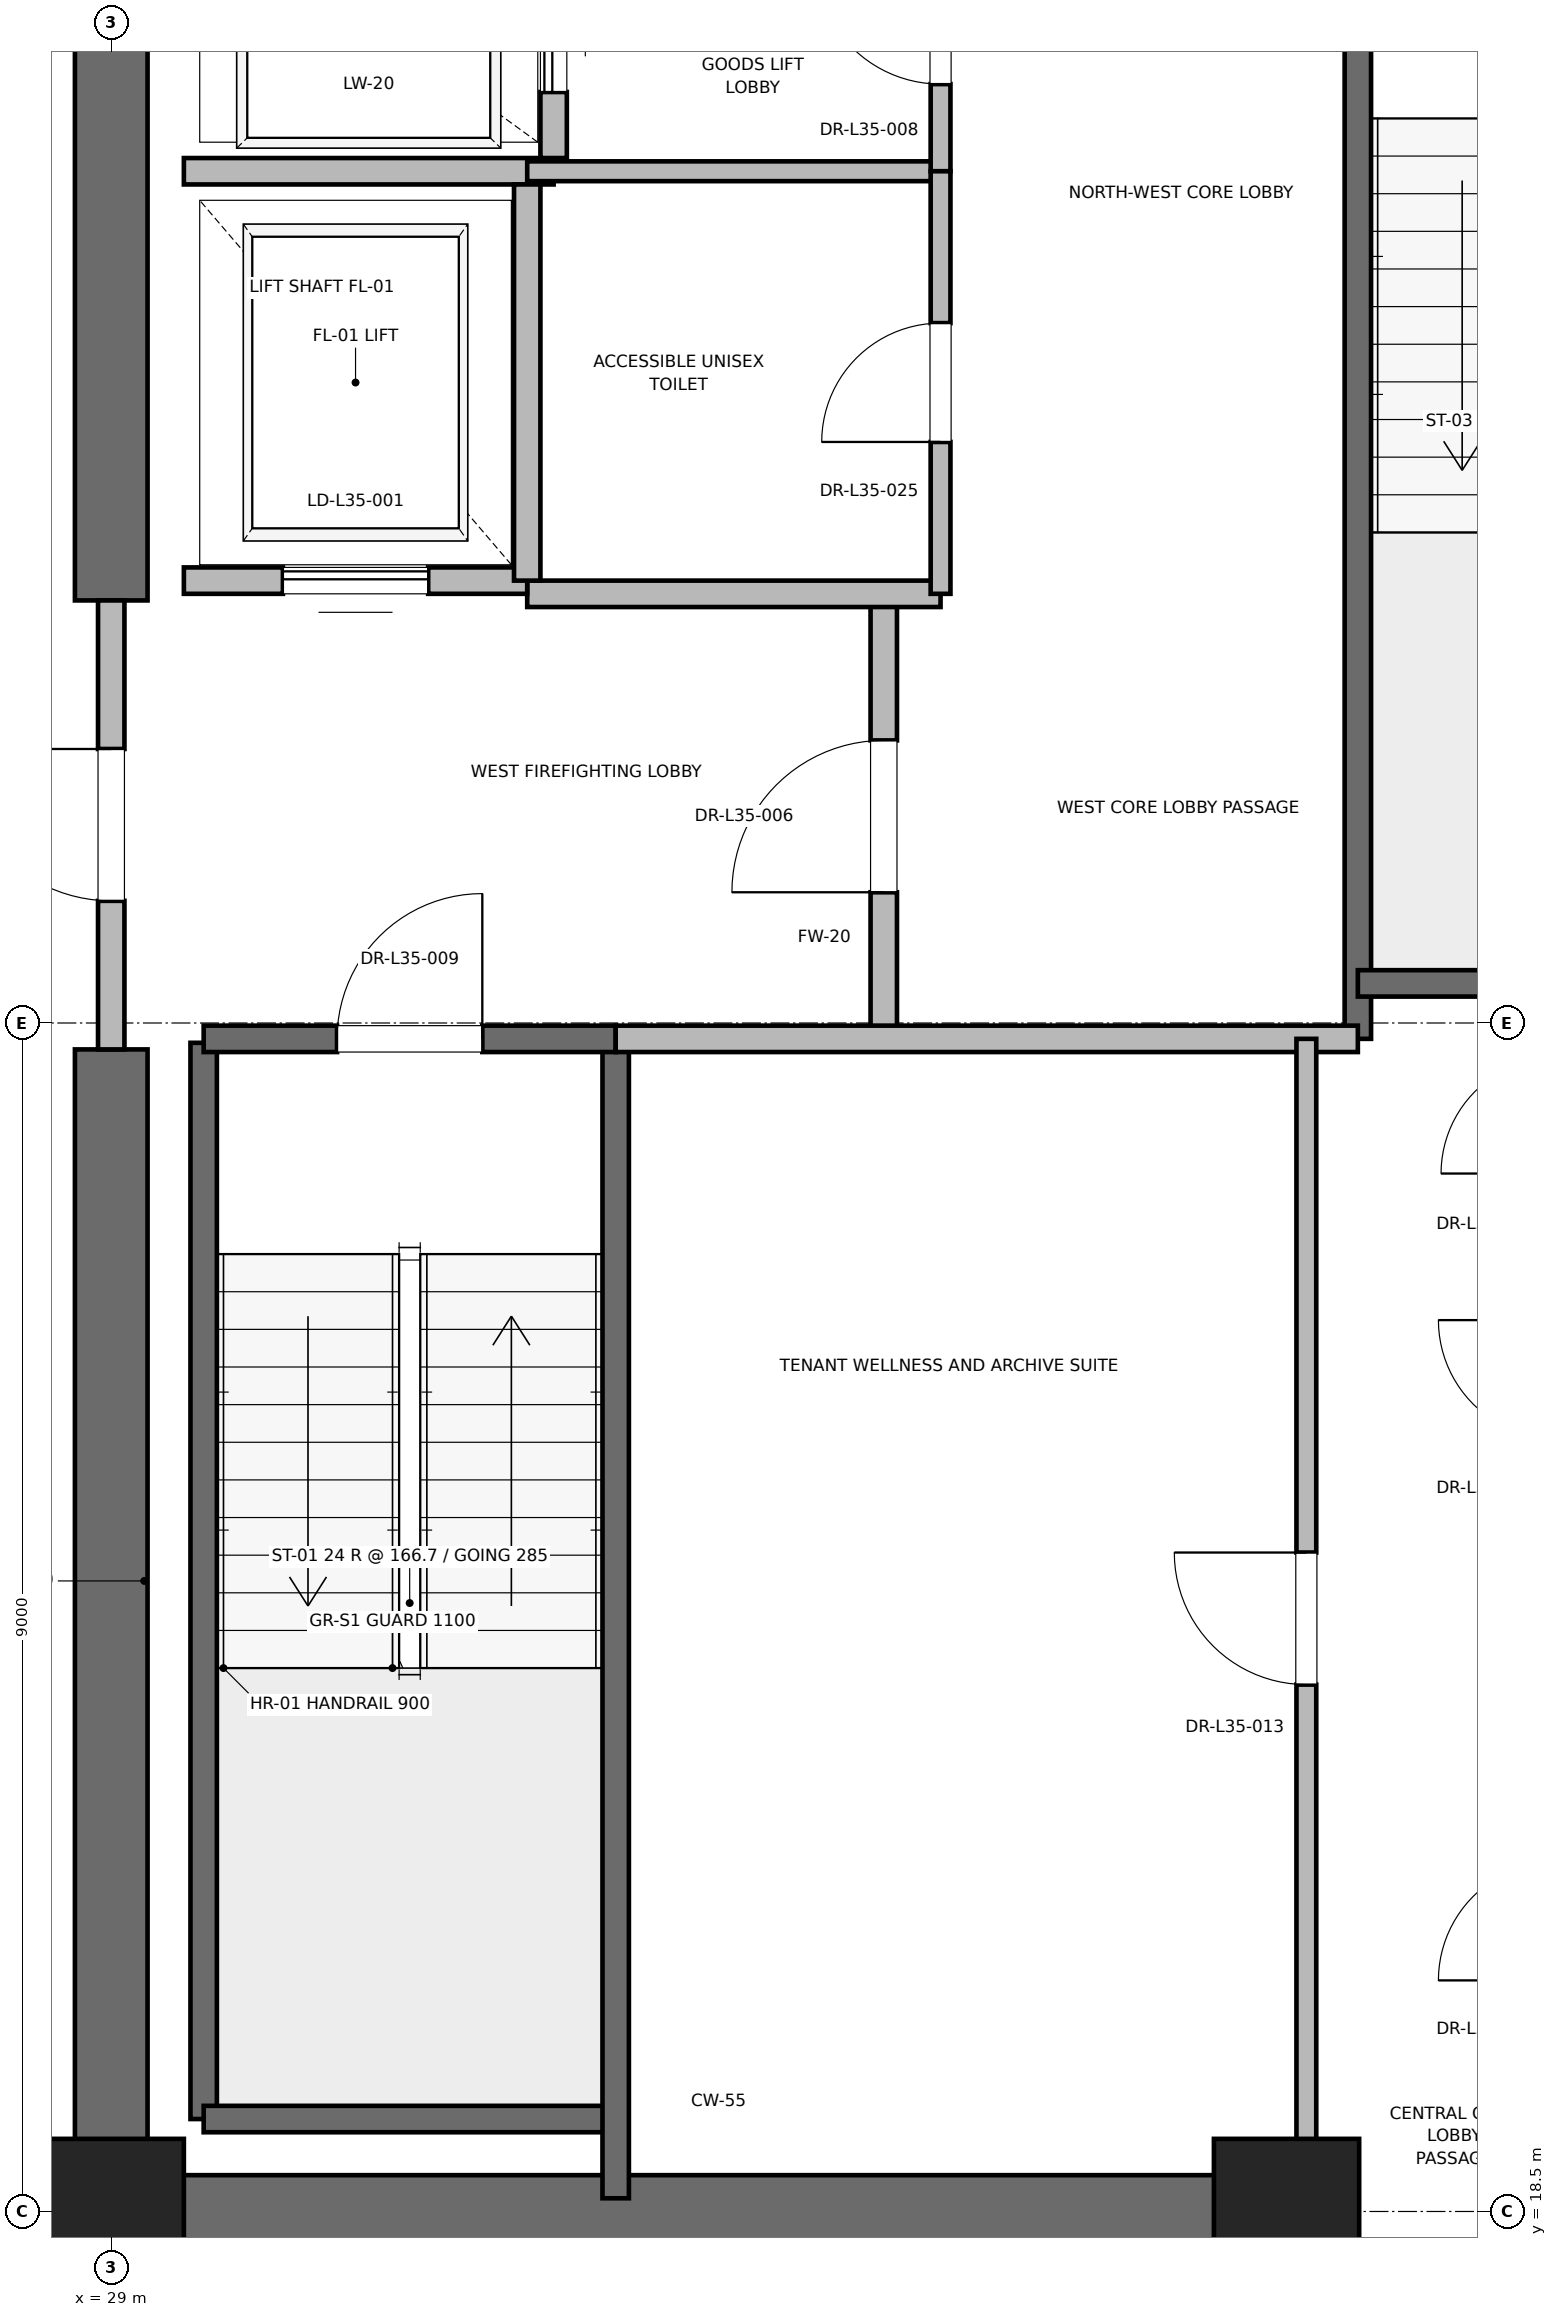
"""IFC4 building model, lengths in metres.
Left out: names, types, materials, properties, quantities, classifications, styles, units other than length and angle.
Written with IfcOpenShell. Run it as: python <this file> out.ifc"""

import sys

from ifc_helpers import new_model, si_unit, direction, frame, frame_2d, origin, origin_2d, place, context, subcontext, project, spatial, rectangle, extrude, element, fill, save


model = new_model("IFC4")
c1 = context("Model", 3, precision=1e-05, world=origin(), true_north=direction((0.0, 1.0)))
c2 = subcontext(c1, "Body", "Model", "MODEL_VIEW")
j1 = project(units=[si_unit("LENGTHUNIT", "METRE"), si_unit("PLANEANGLEUNIT", "RADIAN")], contexts=[c1])
p1 = place(None, origin())
s1 = spatial("IfcSite", under=j1, at=p1, CompositionType="ELEMENT")
p2 = place(p1, origin())
s2 = spatial("IfcBuilding", under=s1, at=p2, CompositionType="ELEMENT")
p3 = place(p2, frame((0.0, 0.0, 152.4)))
s3 = spatial("IfcBuildingStorey", under=s2, at=p3, CompositionType="ELEMENT", Elevation=152.4)
for number, where, z_axis, x_axis in (
    (1, (29.0, 18.5, 0.0), (0.0, 0.0, 1.0), (1.0, 0.0, 0.0)),
    (2, (37.9, 18.5, 0.0), (0.0, 0.0, 1.0), (1.0, 0.0, 0.0)),
):
    element("IfcColumn", number, at=place(p3, frame(where, z_axis=z_axis, x_axis=x_axis)), inside=s3, PredefinedType="PILASTER", context=c2, shape_type="SweptSolid", body=[
        extrude(rectangle(XDim=1.1, YDim=1.1, at=origin_2d()), origin(), (0.0, 0.0, 1.0), 4.0),
    ])
p4 = place(p3, frame((29.0, 18.5, 0.0), z_axis=(0.0, 0.0, 1.0), x_axis=(1.0, 0.0, 0.0)))
e3 = element("IfcWall", 3, at=p4, inside=s3, PredefinedType="SHEAR", context=c2, shape_type="SweptSolid", body=[
    extrude(rectangle(XDim=9.2, YDim=0.55, at=frame_2d((4.6, 0.0))), origin(), (0.0, 0.0, 1.0), 3.775),
])
p5 = place(p3, frame((29.0, 18.5, 0.0), z_axis=(0.0, 0.0, 1.0), x_axis=(0.0, 1.0, 0.0)))
e4 = element("IfcWall", 4, at=p5, inside=s3, PredefinedType="SHEAR", context=c2, shape_type="SweptSolid", body=[
    extrude(rectangle(XDim=8.8, YDim=0.55, at=frame_2d((4.4, 0.0))), origin(), (0.0, 0.0, 1.0), 3.775),
])
p6 = place(p3, frame((29.0, 30.7, 0.0), z_axis=(0.0, 0.0, 1.0), x_axis=(0.0, 1.0, 0.0)))
e5 = element("IfcWall", 5, at=p6, inside=s3, PredefinedType="SHEAR", context=c2, shape_type="SweptSolid", body=[
    extrude(rectangle(XDim=5.8, YDim=0.55, at=frame_2d((2.9, 0.0))), origin(), (0.0, 0.0, 1.0), 3.775),
])
p7 = place(p3, frame((29.7, 19.2, 0.0), z_axis=(0.0, 0.0, 1.0), x_axis=(0.0, 1.0, 0.0)))
e6 = element("IfcWall", 6, at=p7, inside=s3, PredefinedType="SOLIDWALL", context=c2, shape_type="SweptSolid", body=[
    extrude(rectangle(XDim=8.15, YDim=0.2, at=frame_2d((4.075, 0.0))), origin(), (0.0, 0.0, 1.0), 3.775),
])
p8 = place(p3, frame((29.7, 19.2, 0.0), z_axis=(0.0, 0.0, 1.0), x_axis=(1.0, 0.0, 0.0)))
e7 = element("IfcWall", 7, at=p8, inside=s3, PredefinedType="SOLIDWALL", context=c2, shape_type="SweptSolid", body=[
    extrude(rectangle(XDim=3.12, YDim=0.2, at=frame_2d((1.56, 0.0))), origin(), (0.0, 0.0, 1.0), 3.775),
])
p9 = place(p3, frame((32.82, 18.6, 0.0), z_axis=(0.0, 0.0, 1.0), x_axis=(0.0, 1.0, 0.0)))
e8 = element("IfcWall", 8, at=p9, inside=s3, PredefinedType="SOLIDWALL", context=c2, shape_type="SweptSolid", body=[
    extrude(rectangle(XDim=8.78, YDim=0.2, at=frame_2d((4.39, 0.0))), origin(), (0.0, 0.0, 1.0), 3.775),
])
p10 = place(p3, frame((29.7, 27.38, 0.0), z_axis=(0.0, 0.0, 1.0), x_axis=(1.0, 0.0, 0.0)))
e9 = element("IfcWall", 9, at=p10, inside=s3, PredefinedType="SOLIDWALL", context=c2, shape_type="SweptSolid", body=[
    extrude(rectangle(XDim=3.12, YDim=0.2, at=frame_2d((1.56, 0.0))), origin(), (0.0, 0.0, 1.0), 3.775),
])
p11 = place(p10, frame((1.01, 0.0, 0.0)))
e10 = element("IfcOpeningElement", 10, at=p11, cuts=e9, PredefinedType="OPENING", context=c2, shape_type="SweptSolid", body=[
    extrude(rectangle(XDim=1.1, YDim=2.15, at=frame_2d((0.55, 1.075))), frame((0.0, 0.1, 0.0), z_axis=(0.0, -1.0, 0.0), x_axis=(1.0, 0.0, 0.0)), (0.0, 0.0, 1.0), 0.2),
])
p12 = place(p3, frame((38.44, 27.38, 0.0), z_axis=(0.0, 0.0, 1.0), x_axis=(0.0, 1.0, 0.0)))
e11 = element("IfcWall", 11, at=p12, inside=s3, PredefinedType="SOLIDWALL", context=c2, shape_type="SweptSolid", body=[
    extrude(rectangle(XDim=8.87, YDim=0.2, at=frame_2d((4.435, 0.0))), origin(), (0.0, 0.0, 1.0), 3.775),
])
p13 = place(p3, frame((38.44, 27.8, 0.0), z_axis=(0.0, 0.0, 1.0), x_axis=(1.0, 0.0, 0.0)))
e12 = element("IfcWall", 12, at=p13, inside=s3, PredefinedType="SOLIDWALL", context=c2, shape_type="SweptSolid", body=[
    extrude(rectangle(XDim=3.32, YDim=0.2, at=frame_2d((1.66, 0.0))), origin(), (0.0, 0.0, 1.0), 3.775),
])
p14 = place(p3, frame((34.85, 27.38, 0.0), z_axis=(0.0, 0.0, 1.0), x_axis=(0.0, 1.0, 0.0)))
e13 = element("IfcWall", 13, at=p14, inside=s3, PredefinedType="PARTITIONING", context=c2, shape_type="SweptSolid", body=[
    extrude(rectangle(XDim=3.37, YDim=0.2, at=frame_2d((1.685, 0.0))), origin(), (0.0, 0.0, 1.0), 3.775),
])
p15 = place(p14, frame((1.11, 0.0, 0.0)))
e14 = element("IfcOpeningElement", 14, at=p15, cuts=e13, PredefinedType="OPENING", context=c2, shape_type="SweptSolid", body=[
    extrude(rectangle(XDim=1.15, YDim=2.2, at=frame_2d((0.575, 1.1))), frame((0.0, 0.1, 0.0), z_axis=(0.0, -1.0, 0.0), x_axis=(1.0, 0.0, 0.0)), (0.0, 0.0, 1.0), 0.2),
])
p16 = place(p3, frame((29.0, 27.3, 0.0), z_axis=(0.0, 0.0, 1.0), x_axis=(0.0, 1.0, 0.0)))
e15 = element("IfcWall", 15, at=p16, inside=s3, PredefinedType="PARTITIONING", context=c2, shape_type="SweptSolid", body=[
    extrude(rectangle(XDim=3.4, YDim=0.2, at=frame_2d((1.7, 0.0))), origin(), (0.0, 0.0, 1.0), 2.755),
])
p17 = place(p16, frame((1.125, 0.0, 0.0)))
e16 = element("IfcOpeningElement", 16, at=p17, cuts=e15, PredefinedType="OPENING", context=c2, shape_type="SweptSolid", body=[
    extrude(rectangle(XDim=1.15, YDim=2.2, at=frame_2d((0.575, 1.1))), frame((0.0, 0.1, 0.0), z_axis=(0.0, -1.0, 0.0), x_axis=(1.0, 0.0, 0.0)), (0.0, 0.0, 1.0), 0.2),
])
p18 = place(p3, frame((32.82, 27.38, 0.0), z_axis=(0.0, 0.0, 1.0), x_axis=(1.0, 0.0, 0.0)))
e17 = element("IfcWall", 17, at=p18, inside=s3, PredefinedType="PARTITIONING", context=c2, shape_type="SweptSolid", body=[
    extrude(rectangle(XDim=5.62, YDim=0.2, at=frame_2d((2.81, 0.0))), origin(), (0.0, 0.0, 1.0), 3.775),
])
p19 = place(p3, frame((32.15, 30.75, 0.0), z_axis=(0.0, 0.0, 1.0), x_axis=(1.0, 0.0, 0.0)))
e18 = element("IfcWall", 18, at=p19, inside=s3, PredefinedType="PARTITIONING", context=c2, shape_type="SweptSolid", body=[
    extrude(rectangle(XDim=3.13, YDim=0.2, at=frame_2d((1.565, 0.0))), origin(), (0.0, 0.0, 1.0), 3.775),
])
p20 = place(p3, frame((29.55, 30.85, 0.0), z_axis=(0.0, 0.0, 1.0), x_axis=(1.0, 0.0, 0.0)))
e19 = element("IfcWall", 19, at=p20, inside=s3, PredefinedType="SOLIDWALL", context=c2, shape_type="SweptSolid", body=[
    extrude(rectangle(XDim=2.6, YDim=0.2, at=frame_2d((1.3, 0.0))), origin(), (0.0, 0.0, 1.0), 2.755),
])
p21 = place(p20, frame((0.75, 0.0, 0.0)))
e20 = element("IfcOpeningElement", 20, at=p21, cuts=e19, PredefinedType="OPENING", context=c2, shape_type="SweptSolid", body=[
    extrude(rectangle(XDim=1.1, YDim=2.2, at=frame_2d((0.55, 1.1))), frame((0.0, 0.1, 0.0), z_axis=(0.0, -1.0, 0.0), x_axis=(1.0, 0.0, 0.0)), (0.0, 0.0, 1.0), 0.2),
])
p22 = place(p3, frame((29.55, 33.95, 0.0), z_axis=(0.0, 0.0, 1.0), x_axis=(1.0, 0.0, 0.0)))
e21 = element("IfcWall", 21, at=p22, inside=s3, PredefinedType="SOLIDWALL", context=c2, shape_type="SweptSolid", body=[
    extrude(rectangle(XDim=2.8, YDim=0.2, at=frame_2d((1.4, 0.0))), origin(), (0.0, 0.0, 1.0), 3.775),
])
p23 = place(p3, frame((32.15, 30.85, 0.0), z_axis=(0.0, 0.0, 1.0), x_axis=(0.0, 1.0, 0.0)))
e22 = element("IfcWall", 22, at=p23, inside=s3, PredefinedType="SOLIDWALL", context=c2, shape_type="SweptSolid", body=[
    extrude(rectangle(XDim=3.0, YDim=0.2, at=frame_2d((1.5, 0.0))), origin(), (0.0, 0.0, 1.0), 3.775),
])
p24 = place(p3, frame((32.35, 34.05, 0.0), z_axis=(0.0, 0.0, 1.0), x_axis=(0.0, 1.0, 0.0)))
e23 = element("IfcWall", 23, at=p24, inside=s3, PredefinedType="SOLIDWALL", context=c2, shape_type="SweptSolid", body=[
    extrude(rectangle(XDim=2.1, YDim=0.2, at=frame_2d((1.05, 0.0))), origin(), (0.0, 0.0, 1.0), 3.775),
])
p25 = place(p24, frame((0.5, 0.0, 0.0)))
e24 = element("IfcOpeningElement", 24, at=p25, cuts=e23, PredefinedType="OPENING", context=c2, shape_type="SweptSolid", body=[
    extrude(rectangle(XDim=1.1, YDim=2.2, at=frame_2d((0.55, 1.1))), frame((0.0, 0.1, 0.0), z_axis=(0.0, -1.0, 0.0), x_axis=(1.0, 0.0, 0.0)), (0.0, 0.0, 1.0), 0.2),
])
p26 = place(p3, frame((32.15, 33.95, 0.0), z_axis=(0.0, 0.0, 1.0), x_axis=(1.0, 0.0, 0.0)))
e25 = element("IfcWall", 25, at=p26, inside=s3, PredefinedType="PARTITIONING", context=c2, shape_type="SweptSolid", body=[
    extrude(rectangle(XDim=3.13, YDim=0.15, at=frame_2d((1.565, 0.0))), origin(), (0.0, 0.0, 1.0), 2.85),
])
p27 = place(p3, frame((35.28, 33.95, 0.0), z_axis=(0.0, 0.0, 1.0), x_axis=(0.0, 1.0, 0.0)))
e26 = element("IfcWall", 26, at=p27, inside=s3, PredefinedType="PARTITIONING", context=c2, shape_type="SweptSolid", body=[
    extrude(rectangle(XDim=2.27, YDim=0.15, at=frame_2d((1.135, 0.0))), origin(), (0.0, 0.0, 1.0), 2.755),
])
p28 = place(p27, frame((0.66, 0.0, 0.0)))
e27 = element("IfcOpeningElement", 27, at=p28, cuts=e26, PredefinedType="OPENING", context=c2, shape_type="SweptSolid", body=[
    extrude(rectangle(XDim=0.95, YDim=2.15, at=frame_2d((0.475, 1.075))), frame((0.0, 0.075, 0.0), z_axis=(0.0, -1.0, 0.0), x_axis=(1.0, 0.0, 0.0)), (0.0, 0.0, 1.0), 0.15),
])
p29 = place(p3, frame((35.28, 30.75, 0.0), z_axis=(0.0, 0.0, 1.0), x_axis=(0.0, 1.0, 0.0)))
e28 = element("IfcWall", 28, at=p29, inside=s3, PredefinedType="PARTITIONING", context=c2, shape_type="SweptSolid", body=[
    extrude(rectangle(XDim=3.2, YDim=0.15, at=frame_2d((1.6, 0.0))), origin(), (0.0, 0.0, 1.0), 2.85),
])
p30 = place(p29, frame((1.15, 0.0, 0.0)))
e29 = element("IfcOpeningElement", 29, at=p30, cuts=e28, PredefinedType="OPENING", context=c2, shape_type="SweptSolid", body=[
    extrude(rectangle(XDim=0.9, YDim=2.1, at=frame_2d((0.45, 1.05))), frame((0.0, 0.075, 0.0), z_axis=(0.0, -1.0, 0.0), x_axis=(1.0, 0.0, 0.0)), (0.0, 0.0, 1.0), 0.15),
])
p31 = place(p3, frame((38.05, 18.6, 0.0), z_axis=(0.0, 0.0, 1.0), x_axis=(0.0, 1.0, 0.0)))
e30 = element("IfcWall", 30, at=p31, inside=s3, PredefinedType="PARTITIONING", context=c2, shape_type="SweptSolid", body=[
    extrude(rectangle(XDim=8.78, YDim=0.15, at=frame_2d((4.39, 0.0))), origin(), (0.0, 0.0, 1.0), 2.755),
])
p32 = place(p31, frame((3.89, 0.0, 0.0)))
e31 = element("IfcOpeningElement", 31, at=p32, cuts=e30, PredefinedType="OPENING", context=c2, shape_type="SweptSolid", body=[
    extrude(rectangle(XDim=1.0, YDim=2.15, at=frame_2d((0.5, 1.075))), frame((0.0, 0.075, 0.0), z_axis=(0.0, -1.0, 0.0), x_axis=(1.0, 0.0, 0.0)), (0.0, 0.0, 1.0), 0.15),
])
p33 = place(p11, origin())
e32 = element("IfcDoor", 32, at=p33, inside=s3, OperationType="SINGLE_SWING_RIGHT", PredefinedType="DOOR", context=c2, shape_type="SweptSolid", body=[
    extrude(rectangle(XDim=1.1, YDim=2.15, at=frame_2d((0.55, 1.075))), frame((0.0, 0.025, 0.0), z_axis=(0.0, -1.0, 0.0), x_axis=(1.0, 0.0, 0.0)), (0.0, 0.0, 1.0), 0.05),
])
fill(e10, e32)
p34 = place(p15, origin())
e33 = element("IfcDoor", 33, at=p34, inside=s3, OperationType="SINGLE_SWING_LEFT", PredefinedType="DOOR", context=c2, shape_type="SweptSolid", body=[
    extrude(rectangle(XDim=1.15, YDim=2.2, at=frame_2d((0.575, 1.1))), frame((0.0, 0.025, 0.0), z_axis=(0.0, -1.0, 0.0), x_axis=(1.0, 0.0, 0.0)), (0.0, 0.0, 1.0), 0.05),
])
fill(e14, e33)
p35 = place(p17, origin())
e34 = element("IfcDoor", 34, at=p35, inside=s3, OperationType="SINGLE_SWING_RIGHT", PredefinedType="DOOR", context=c2, shape_type="SweptSolid", body=[
    extrude(rectangle(XDim=1.15, YDim=2.2, at=frame_2d((0.575, 1.1))), frame((0.0, 0.025, 0.0), z_axis=(0.0, -1.0, 0.0), x_axis=(1.0, 0.0, 0.0)), (0.0, 0.0, 1.0), 0.05),
])
fill(e16, e34)
p36 = place(p21, origin())
e35 = element("IfcDoor", 35, at=p36, inside=s3, OperationType="SLIDING_TO_RIGHT", PredefinedType="DOOR", context=c2, shape_type="SweptSolid", body=[
    extrude(rectangle(XDim=1.1, YDim=2.2, at=frame_2d((0.55, 1.1))), frame((0.0, 0.025, 0.0), z_axis=(0.0, -1.0, 0.0), x_axis=(1.0, 0.0, 0.0)), (0.0, 0.0, 1.0), 0.05),
])
fill(e20, e35)
p37 = place(p25, origin())
e36 = element("IfcDoor", 36, at=p37, inside=s3, OperationType="SLIDING_TO_RIGHT", PredefinedType="DOOR", context=c2, shape_type="SweptSolid", body=[
    extrude(rectangle(XDim=1.1, YDim=2.2, at=frame_2d((0.55, 1.1))), frame((0.0, 0.025, 0.0), z_axis=(0.0, -1.0, 0.0), x_axis=(1.0, 0.0, 0.0)), (0.0, 0.0, 1.0), 0.05),
])
fill(e24, e36)
p38 = place(p28, origin())
e37 = element("IfcDoor", 37, at=p38, inside=s3, OperationType="SINGLE_SWING_RIGHT", PredefinedType="DOOR", context=c2, shape_type="SweptSolid", body=[
    extrude(rectangle(XDim=0.95, YDim=2.15, at=frame_2d((0.475, 1.075))), frame((0.0, 0.025, 0.0), z_axis=(0.0, -1.0, 0.0), x_axis=(1.0, 0.0, 0.0)), (0.0, 0.0, 1.0), 0.05),
])
fill(e27, e37)
p39 = place(p30, origin())
e38 = element("IfcDoor", 38, at=p39, inside=s3, OperationType="SINGLE_SWING_LEFT", PredefinedType="DOOR", context=c2, shape_type="SweptSolid", body=[
    extrude(rectangle(XDim=0.9, YDim=2.1, at=frame_2d((0.45, 1.05))), frame((0.0, 0.025, 0.0), z_axis=(0.0, -1.0, 0.0), x_axis=(1.0, 0.0, 0.0)), (0.0, 0.0, 1.0), 0.05),
])
fill(e29, e38)
p40 = place(p32, origin())
e39 = element("IfcDoor", 39, at=p40, inside=s3, OperationType="SINGLE_SWING_RIGHT", PredefinedType="DOOR", context=c2, shape_type="SweptSolid", body=[
    extrude(rectangle(XDim=1.0, YDim=2.15, at=frame_2d((0.5, 1.075))), frame((0.0, 0.025, 0.0), z_axis=(0.0, -1.0, 0.0), x_axis=(1.0, 0.0, 0.0)), (0.0, 0.0, 1.0), 0.05),
])
fill(e31, e39)
save(model, sys.argv[1])
